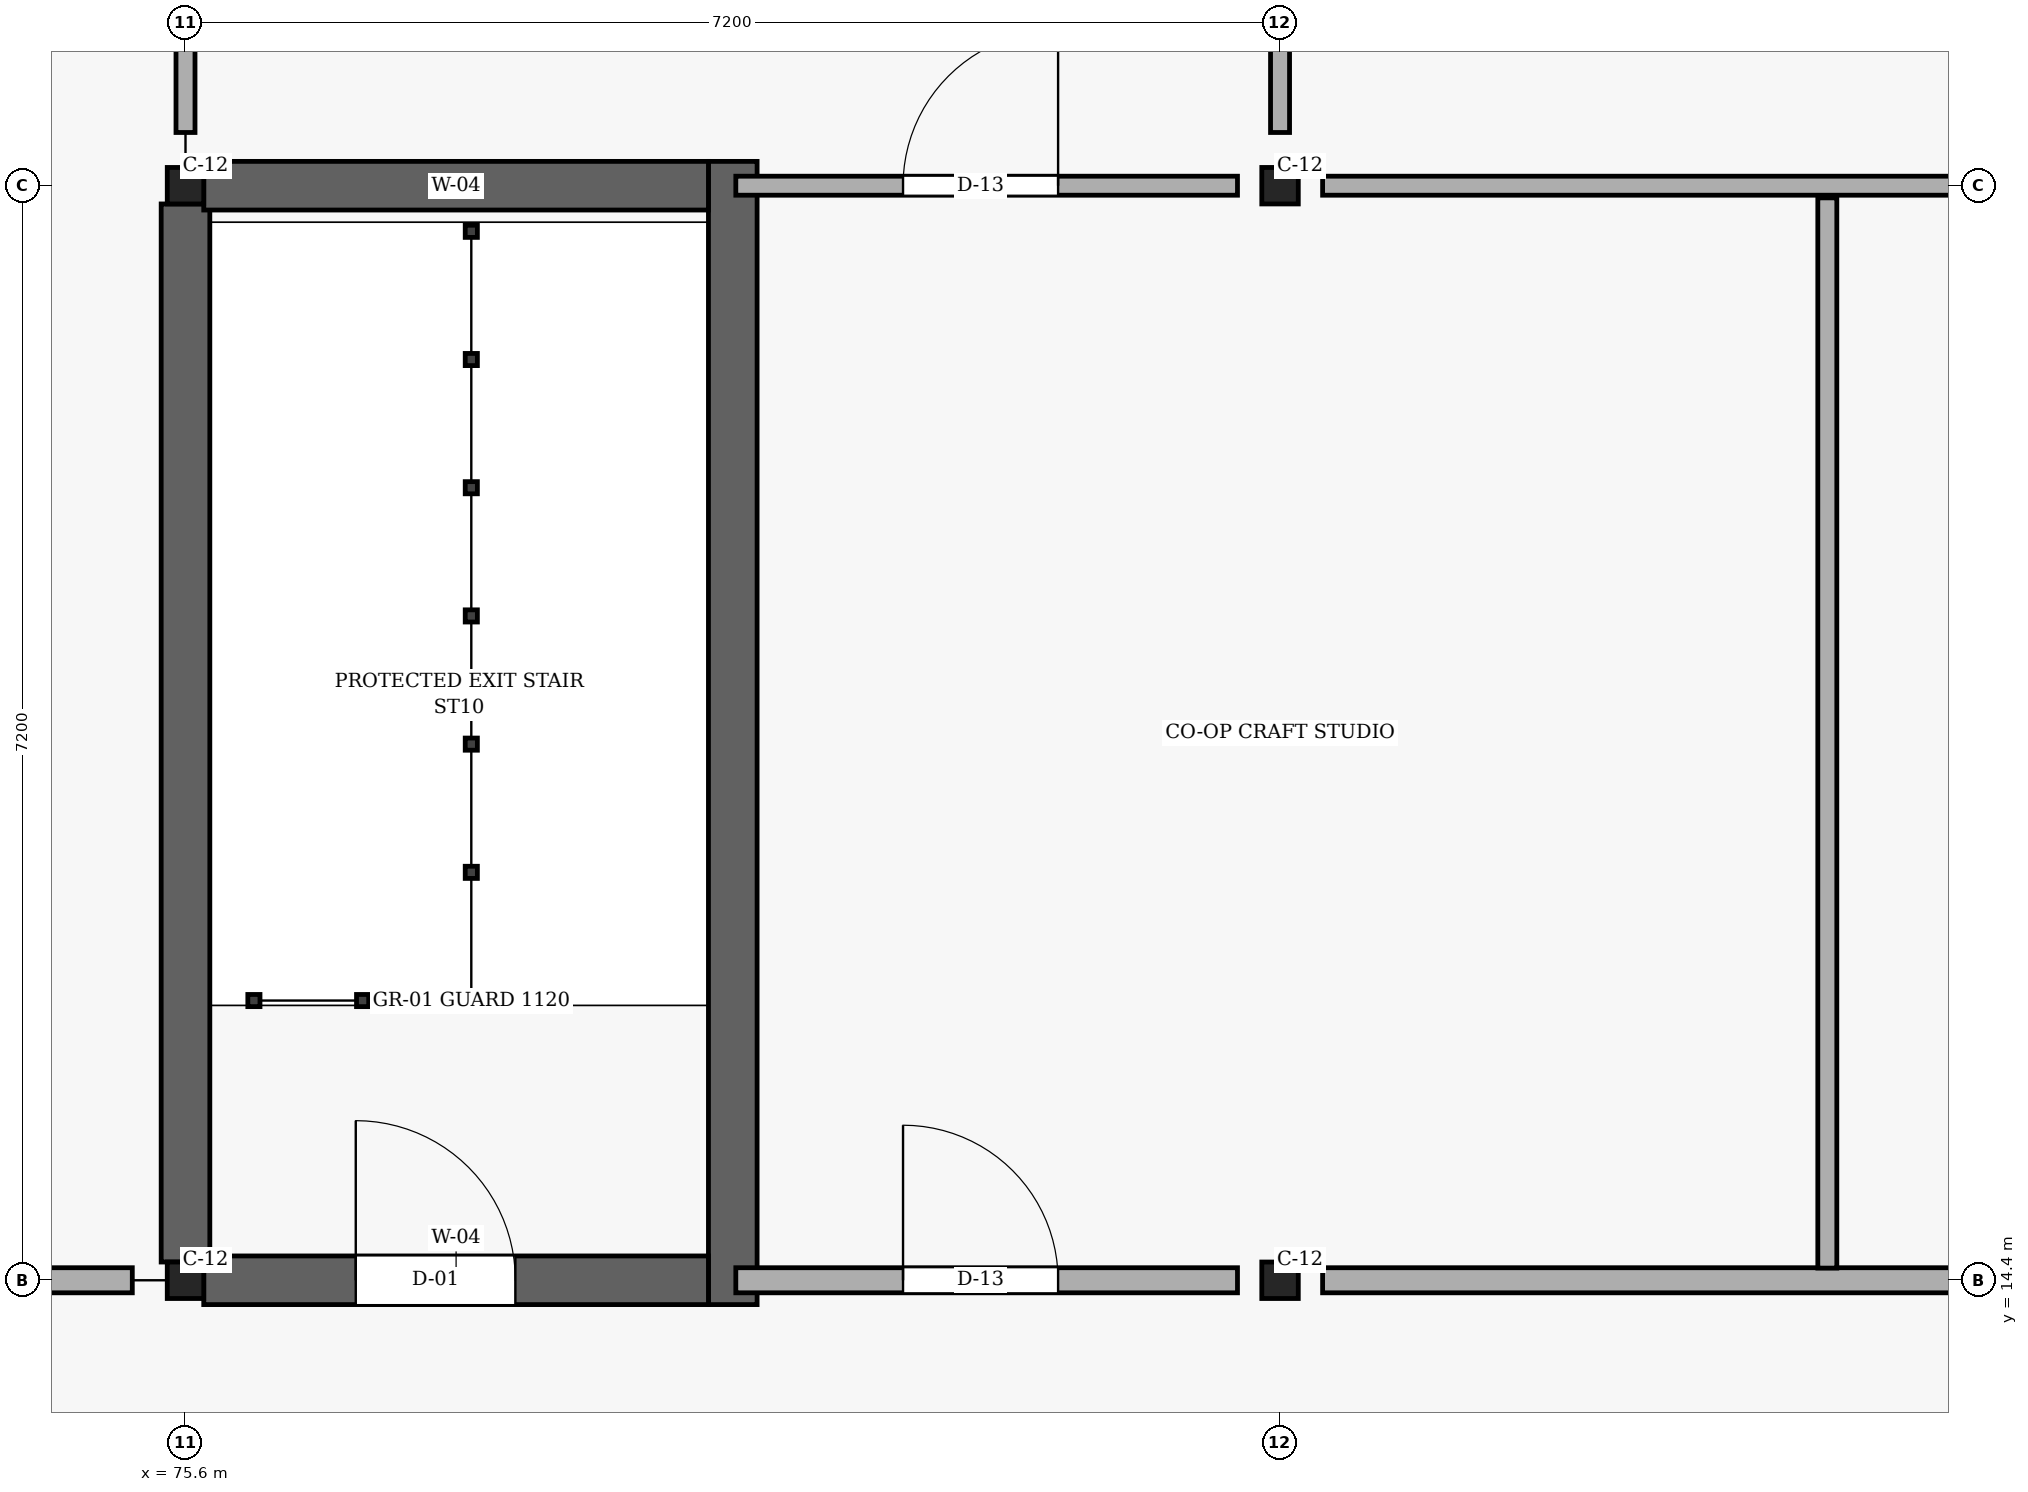
"""IFC4 building model, lengths in metres.
Left out: names, types, materials, properties, quantities, classifications, styles, units other than length and angle.
Written with IfcOpenShell. Run it as: python <this file> out.ifc"""

import sys

from ifc_helpers import new_model, si_unit, direction, frame, frame_2d, origin, origin_2d, place, context, subcontext, project, spatial, rectangle, i_section, extrude, element, fill, save


model = new_model("IFC4")
c1 = context("Model", 3, precision=1e-05, world=origin(), true_north=direction((0.0, 1.0)))
c2 = subcontext(c1, "Body", "Model", "MODEL_VIEW")
j1 = project(units=[si_unit("LENGTHUNIT", "METRE"), si_unit("PLANEANGLEUNIT", "RADIAN")], contexts=[c1])
p1 = place(None, origin())
s1 = spatial("IfcSite", under=j1, at=p1, CompositionType="ELEMENT")
p2 = place(p1, origin())
s2 = spatial("IfcBuilding", under=s1, at=p2, CompositionType="ELEMENT")
p3 = place(p2, frame((0.0, 0.0, 4.5)))
s3 = spatial("IfcBuildingStorey", under=s2, at=p3, CompositionType="ELEMENT", Elevation=4.5)
for number, where, z_axis, x_axis in (
    (1, (75.6, 14.4, 0.0), (0.0, 0.0, 1.0), (1.0, 0.0, 0.0)),
    (2, (75.6, 21.6, 0.0), (0.0, 0.0, 1.0), (1.0, 0.0, 0.0)),
    (3, (82.8, 14.4, 0.0), (0.0, 0.0, 1.0), (1.0, 0.0, 0.0)),
    (4, (82.8, 21.6, 0.0), (0.0, 0.0, 1.0), (1.0, 0.0, 0.0)),
):
    element("IfcColumn", number, at=place(p3, frame(where, z_axis=z_axis, x_axis=x_axis)), inside=s3, PredefinedType="COLUMN", context=c2, shape_type="SweptSolid", body=[
        extrude(i_section(OverallWidth=0.24, OverallDepth=0.24, WebThickness=0.01, FlangeThickness=0.017, FilletRadius=0.021, at=origin_2d()), origin(), (0.0, 0.0, 1.0), 3.15),
    ])
p4 = place(p3, frame((75.6, 14.52, 0.0), z_axis=(0.0, 0.0, 1.0), x_axis=(0.0, 1.0, 0.0)))
e5 = element("IfcWall", 5, at=p4, inside=s3, PredefinedType="SHEAR", context=c2, shape_type="SweptSolid", body=[
    extrude(rectangle(XDim=6.96, YDim=0.32, at=frame_2d((3.48, 0.0))), origin(), (0.0, 0.0, 1.0), 2.89),
])
p5 = place(p3, frame((79.2, 14.24, 0.0), z_axis=(0.0, 0.0, 1.0), x_axis=(0.0, 1.0, 0.0)))
e6 = element("IfcWall", 6, at=p5, inside=s3, PredefinedType="SHEAR", context=c2, shape_type="SweptSolid", body=[
    extrude(rectangle(XDim=7.52, YDim=0.32, at=frame_2d((3.76, 0.0))), origin(), (0.0, 0.0, 1.0), 2.89),
])
p6 = place(p3, frame((75.72, 21.6, 0.0), z_axis=(0.0, 0.0, 1.0), x_axis=(1.0, 0.0, 0.0)))
e7 = element("IfcWall", 7, at=p6, inside=s3, PredefinedType="SHEAR", context=c2, shape_type="SweptSolid", body=[
    extrude(rectangle(XDim=3.32, YDim=0.32, at=frame_2d((1.66, 0.0))), origin(), (0.0, 0.0, 1.0), 2.89),
])
p7 = place(p3, frame((75.72, 14.4, 0.0), z_axis=(0.0, 0.0, 1.0), x_axis=(1.0, 0.0, 0.0)))
e8 = element("IfcWall", 8, at=p7, inside=s3, PredefinedType="SHEAR", context=c2, shape_type="SweptSolid", body=[
    extrude(rectangle(XDim=3.32, YDim=0.32, at=frame_2d((1.66, 0.0))), origin(), (0.0, 0.0, 1.0), 2.89),
])
p8 = place(p7, frame((1.0, 0.0, 0.0)))
e9 = element("IfcOpeningElement", 9, at=p8, cuts=e8, PredefinedType="OPENING", context=c2, shape_type="SweptSolid", body=[
    extrude(rectangle(XDim=1.05, YDim=2.15, at=frame_2d((0.525, 1.075))), frame((0.0, 0.17, 0.0), z_axis=(0.0, -1.0, 0.0), x_axis=(1.0, 0.0, 0.0)), (0.0, 0.0, 1.0), 0.34),
])
p9 = place(p3, frame((61.55, 14.4, 0.0), z_axis=(0.0, 0.0, 1.0), x_axis=(1.0, 0.0, 0.0)))
e10 = element("IfcWall", 10, at=p9, inside=s3, PredefinedType="PARTITIONING", context=c2, shape_type="SweptSolid", body=[
    extrude(rectangle(XDim=13.7, YDim=0.165, at=frame_2d((6.85, 0.0))), origin(), (0.0, 0.0, 1.0), 2.29),
])
p10 = place(p9, frame((2.4, 0.0, 0.0)))
e11 = element("IfcOpeningElement", 11, at=p10, cuts=e10, PredefinedType="OPENING", context=c2, shape_type="SweptSolid", body=[
    extrude(rectangle(XDim=1.5, YDim=2.25, at=frame_2d((0.75, 1.125))), frame((0.0, 0.093, 0.0), z_axis=(0.0, -1.0, 0.0), x_axis=(1.0, 0.0, 0.0)), (0.0, 0.0, 1.0), 0.185),
])
p11 = place(p3, frame((79.22, 14.4, 0.0), z_axis=(0.0, 0.0, 1.0), x_axis=(1.0, 0.0, 0.0)))
e12 = element("IfcWall", 12, at=p11, inside=s3, PredefinedType="PARTITIONING", context=c2, shape_type="SweptSolid", body=[
    extrude(rectangle(XDim=3.3, YDim=0.165, at=frame_2d((1.65, 0.0))), origin(), (0.0, 0.0, 1.0), 2.29),
])
p12 = place(p11, frame((1.1, 0.0, 0.0)))
e13 = element("IfcOpeningElement", 13, at=p12, cuts=e12, PredefinedType="OPENING", context=c2, shape_type="SweptSolid", body=[
    extrude(rectangle(XDim=1.02, YDim=2.15, at=frame_2d((0.51, 1.075))), frame((0.0, 0.093, 0.0), z_axis=(0.0, -1.0, 0.0), x_axis=(1.0, 0.0, 0.0)), (0.0, 0.0, 1.0), 0.185),
])
p13 = place(p3, frame((83.08, 14.4, 0.0), z_axis=(0.0, 0.0, 1.0), x_axis=(1.0, 0.0, 0.0)))
e14 = element("IfcWall", 14, at=p13, inside=s3, PredefinedType="PARTITIONING", context=c2, shape_type="SweptSolid", body=[
    extrude(rectangle(XDim=6.745, YDim=0.165, at=frame_2d((3.373, 0.0))), origin(), (0.0, 0.0, 1.0), 2.29),
])
p14 = place(p13, frame((4.35, 0.0, 0.0)))
e15 = element("IfcOpeningElement", 15, at=p14, cuts=e14, PredefinedType="OPENING", context=c2, shape_type="SweptSolid", body=[
    extrude(rectangle(XDim=0.9, YDim=2.05, at=frame_2d((0.45, 1.025))), frame((0.0, 0.093, 0.0), z_axis=(0.0, -1.0, 0.0), x_axis=(1.0, 0.0, 0.0)), (0.0, 0.0, 1.0), 0.185),
])
p15 = place(p3, frame((75.6, 21.95, 0.0), z_axis=(0.0, 0.0, 1.0), x_axis=(0.0, 1.0, 0.0)))
e16 = element("IfcWall", 16, at=p15, inside=s3, PredefinedType="PARTITIONING", context=c2, shape_type="SweptSolid", body=[
    extrude(rectangle(XDim=6.5, YDim=0.125, at=frame_2d((3.25, 0.0))), origin(), (0.0, 0.0, 1.0), 2.29),
])
p16 = place(p3, frame((86.4, 14.48, 0.0), z_axis=(0.0, 0.0, 1.0), x_axis=(0.0, 1.0, 0.0)))
e17 = element("IfcWall", 17, at=p16, inside=s3, PredefinedType="PARTITIONING", context=c2, shape_type="SweptSolid", body=[
    extrude(rectangle(XDim=7.04, YDim=0.125, at=frame_2d((3.52, 0.0))), origin(), (0.0, 0.0, 1.0), 2.29),
])
p17 = place(p3, frame((79.22, 21.6, 0.0), z_axis=(0.0, 0.0, 1.0), x_axis=(1.0, 0.0, 0.0)))
e18 = element("IfcWall", 18, at=p17, inside=s3, PredefinedType="PARTITIONING", context=c2, shape_type="SweptSolid", body=[
    extrude(rectangle(XDim=3.3, YDim=0.125, at=frame_2d((1.65, 0.0))), origin(), (0.0, 0.0, 1.0), 2.29),
])
p18 = place(p17, frame((1.1, 0.0, 0.0)))
e19 = element("IfcOpeningElement", 19, at=p18, cuts=e18, PredefinedType="OPENING", context=c2, shape_type="SweptSolid", body=[
    extrude(rectangle(XDim=1.02, YDim=2.15, at=frame_2d((0.51, 1.075))), frame((0.0, 0.073, 0.0), z_axis=(0.0, -1.0, 0.0), x_axis=(1.0, 0.0, 0.0)), (0.0, 0.0, 1.0), 0.145),
])
p19 = place(p3, frame((83.08, 21.6, 0.0), z_axis=(0.0, 0.0, 1.0), x_axis=(1.0, 0.0, 0.0)))
e20 = element("IfcWall", 20, at=p19, inside=s3, PredefinedType="PARTITIONING", context=c2, shape_type="SweptSolid", body=[
    extrude(rectangle(XDim=6.745, YDim=0.125, at=frame_2d((3.373, 0.0))), origin(), (0.0, 0.0, 1.0), 2.29),
])
p20 = place(p3, frame((82.8, 21.95, 0.0), z_axis=(0.0, 0.0, 1.0), x_axis=(0.0, 1.0, 0.0)))
e21 = element("IfcWall", 21, at=p20, inside=s3, PredefinedType="PARTITIONING", context=c2, shape_type="SweptSolid", body=[
    extrude(rectangle(XDim=6.5, YDim=0.125, at=frame_2d((3.25, 0.0))), origin(), (0.0, 0.0, 1.0), 2.29),
])
p21 = place(p20, frame((2.4, 0.0, 0.0)))
e22 = element("IfcOpeningElement", 22, at=p21, cuts=e21, PredefinedType="OPENING", context=c2, shape_type="SweptSolid", body=[
    extrude(rectangle(XDim=1.02, YDim=2.15, at=frame_2d((0.51, 1.075))), frame((0.0, 0.073, 0.0), z_axis=(0.0, -1.0, 0.0), x_axis=(1.0, 0.0, 0.0)), (0.0, 0.0, 1.0), 0.145),
])
p22 = place(p8, frame((1.05, 0.0, 0.0), z_axis=(0.0, 0.0, 1.0), x_axis=(-1.0, 0.0, 0.0)))
e23 = element("IfcDoor", 23, at=p22, inside=s3, OperationType="SINGLE_SWING_LEFT", PredefinedType="DOOR", context=c2, shape_type="SweptSolid", body=[
    extrude(rectangle(XDim=1.05, YDim=2.15, at=frame_2d((0.525, 1.075))), frame((0.0, 0.025, 0.0), z_axis=(0.0, -1.0, 0.0), x_axis=(1.0, 0.0, 0.0)), (0.0, 0.0, 1.0), 0.05),
])
fill(e9, e23)
p23 = place(p12, origin())
e24 = element("IfcDoor", 24, at=p23, inside=s3, OperationType="SINGLE_SWING_LEFT", PredefinedType="DOOR", context=c2, shape_type="SweptSolid", body=[
    extrude(rectangle(XDim=1.02, YDim=2.15, at=frame_2d((0.51, 1.075))), frame((0.0, 0.025, 0.0), z_axis=(0.0, -1.0, 0.0), x_axis=(1.0, 0.0, 0.0)), (0.0, 0.0, 1.0), 0.05),
])
fill(e13, e24)
p24 = place(p18, origin())
e25 = element("IfcDoor", 25, at=p24, inside=s3, OperationType="SINGLE_SWING_RIGHT", PredefinedType="DOOR", context=c2, shape_type="SweptSolid", body=[
    extrude(rectangle(XDim=1.02, YDim=2.15, at=frame_2d((0.51, 1.075))), frame((0.0, 0.025, 0.0), z_axis=(0.0, -1.0, 0.0), x_axis=(1.0, 0.0, 0.0)), (0.0, 0.0, 1.0), 0.05),
])
fill(e19, e25)
save(model, sys.argv[1])
